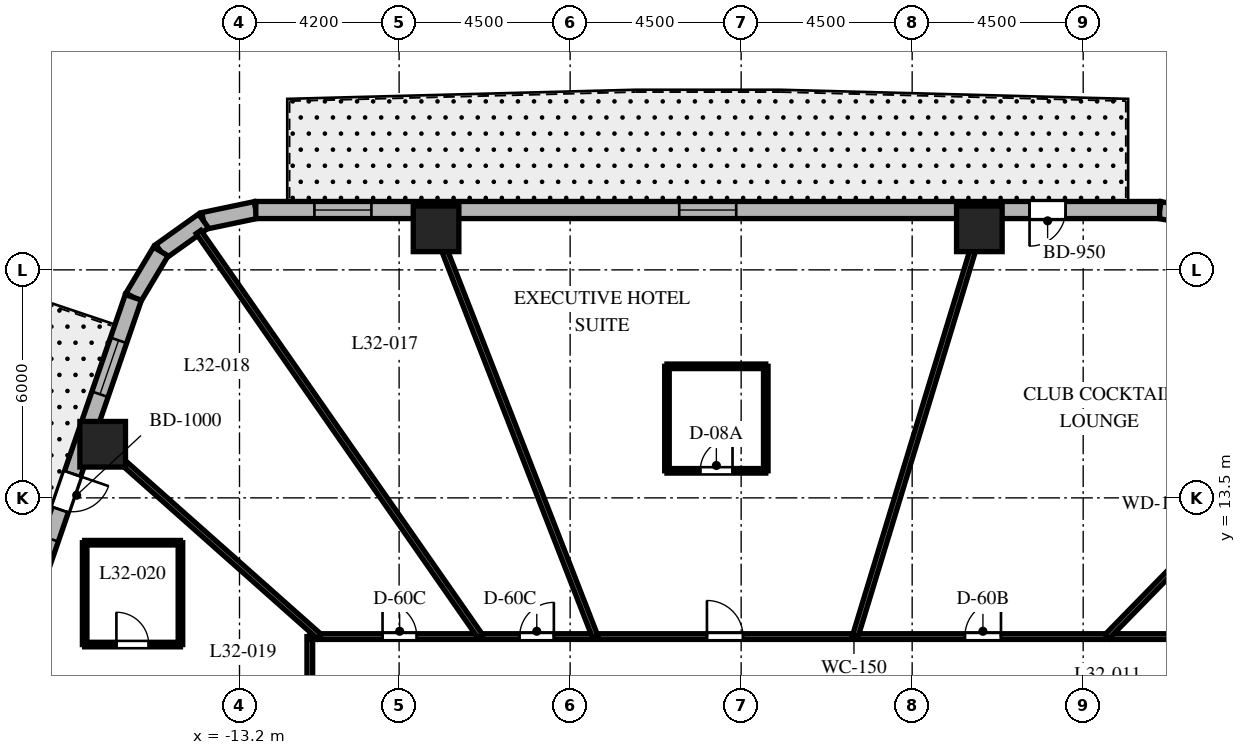
"""IFC4 building model, lengths in metres.
Left out: names, types, materials, properties, quantities, classifications, styles, units other than length and angle.
Written with IfcOpenShell. Run it as: python <this file> out.ifc"""

import sys

from ifc_helpers import new_model, si_unit, direction, frame, frame_2d, origin, origin_2d, place, context, subcontext, project, spatial, rectangle, extrude, element, fill, save


model = new_model("IFC4")
c1 = context("Model", 3, precision=1e-05, world=origin(), true_north=direction((0.0, 1.0)))
c2 = subcontext(c1, "Body", "Model", "MODEL_VIEW")
j1 = project(units=[si_unit("LENGTHUNIT", "METRE"), si_unit("PLANEANGLEUNIT", "RADIAN")], contexts=[c1])
p1 = place(None, origin())
s1 = spatial("IfcSite", under=j1, at=p1, CompositionType="ELEMENT")
p2 = place(p1, origin())
s2 = spatial("IfcBuilding", under=s1, at=p2, CompositionType="ELEMENT")
p3 = place(p2, frame((0.0, 0.0, 132.1)))
s3 = spatial("IfcBuildingStorey", under=s2, at=p3, CompositionType="ELEMENT", Elevation=132.1)
for number, where, z_axis, x_axis in (
    (1, (6.268, 20.58, 0.0), (0.0, 0.0, 1.0), (1.0, 0.0, 0.0)),
    (2, (-8.028, 20.58, 0.0), (0.0, 0.0, 1.0), (1.0, 0.0, 0.0)),
    (3, (-16.8, 14.911, 0.0), (0.0, 0.0, 1.0), (1.0, 0.0, 0.0)),
):
    element("IfcColumn", number, at=place(p3, frame(where, z_axis=z_axis, x_axis=x_axis)), inside=s3, PredefinedType="COLUMN", context=c2, shape_type="SweptSolid", body=[
        extrude(rectangle(XDim=1.2, YDim=1.2, at=origin_2d()), origin(), (0.0, 0.0, 1.0), 3.7),
    ])
p4 = place(p3, frame((12.259, 20.84, 0.0), z_axis=(0.0, 0.0, 1.0), x_axis=(-0.982730354425, 0.185043374624, 0.0)))
e4 = element("IfcWall", 4, at=p4, inside=s3, PredefinedType="SOLIDWALL", context=c2, shape_type="SweptSolid", body=[
    extrude(rectangle(XDim=1.269, YDim=0.45, at=frame_2d((0.635, 0.0))), origin(), (0.0, 0.0, 1.0), 3.4),
])
p5 = place(p3, frame((-12.771, 21.075, 0.0), z_axis=(0.0, 0.0, 1.0), x_axis=(-0.97874281988, -0.205091424819, 0.0)))
e5 = element("IfcWall", 5, at=p5, inside=s3, PredefinedType="SOLIDWALL", context=c2, shape_type="SweptSolid", body=[
    extrude(rectangle(XDim=1.406, YDim=0.45, at=frame_2d((0.703, 0.0))), origin(), (0.0, 0.0, 1.0), 3.4),
])
p6 = place(p3, frame((-14.146, 20.787, 0.0), z_axis=(0.0, 0.0, 1.0), x_axis=(-0.814162929117, -0.580636482536, 0.0)))
e6 = element("IfcWall", 6, at=p6, inside=s3, PredefinedType="SOLIDWALL", context=c2, shape_type="SweptSolid", body=[
    extrude(rectangle(XDim=1.382, YDim=0.45, at=frame_2d((0.691, 0.0))), origin(), (0.0, 0.0, 1.0), 3.4),
])
p7 = place(p3, frame((-15.272, 19.984, 0.0), z_axis=(0.0, 0.0, 1.0), x_axis=(-0.512579347361, -0.858639862025, 0.0)))
e7 = element("IfcWall", 7, at=p7, inside=s3, PredefinedType="SOLIDWALL", context=c2, shape_type="SweptSolid", body=[
    extrude(rectangle(XDim=1.406, YDim=0.45, at=frame_2d((0.703, 0.0))), origin(), (0.0, 0.0, 1.0), 3.4),
])
p8 = place(p3, frame((11.012, 21.075, 0.0), z_axis=(0.0, 0.0, 1.0), x_axis=(-1.0, 0.0, 0.0)))
e8 = element("IfcWall", 8, at=p8, inside=s3, PredefinedType="SOLIDWALL", context=c2, shape_type="SweptSolid", body=[
    extrude(rectangle(XDim=23.782, YDim=0.45, at=frame_2d((11.891, 0.0))), origin(), (0.0, 0.0, 1.0), 3.4),
])
p9 = place(p8, frame((2.473, 0.0, 0.0)))
e9 = element("IfcOpeningElement", 9, at=p9, cuts=e8, PredefinedType="OPENING", context=c2, shape_type="SweptSolid", body=[
    extrude(rectangle(XDim=0.95, YDim=2.15, at=frame_2d((0.475, 1.075))), frame((0.0, 0.235, 0.0), z_axis=(0.0, -1.0, 0.0), x_axis=(1.0, 0.0, 0.0)), (0.0, 0.0, 1.0), 0.47),
])
p10 = place(p8, frame((11.142, 0.0, 0.8)))
e10 = element("IfcOpeningElement", 10, at=p10, cuts=e8, PredefinedType="OPENING", context=c2, shape_type="SweptSolid", body=[
    extrude(rectangle(XDim=1.5, YDim=1.8, at=frame_2d((0.75, 0.9))), frame((0.0, 0.235, 0.0), z_axis=(0.0, -1.0, 0.0), x_axis=(1.0, 0.0, 0.0)), (0.0, 0.0, 1.0), 0.47),
])
p11 = place(p8, frame((20.741, 0.0, 0.8)))
e11 = element("IfcOpeningElement", 11, at=p11, cuts=e8, PredefinedType="OPENING", context=c2, shape_type="SweptSolid", body=[
    extrude(rectangle(XDim=1.5, YDim=1.8, at=frame_2d((0.75, 0.9))), frame((0.0, 0.235, 0.0), z_axis=(0.0, -1.0, 0.0), x_axis=(1.0, 0.0, 0.0)), (0.0, 0.0, 1.0), 0.47),
])
p12 = place(p3, frame((-15.992, 18.777, 0.0), z_axis=(0.0, 0.0, 1.0), x_axis=(-0.325606988926, -0.945505202927, 0.0)))
e12 = element("IfcWall", 12, at=p12, inside=s3, PredefinedType="SOLIDWALL", context=c2, shape_type="SweptSolid", body=[
    extrude(rectangle(XDim=19.669, YDim=0.45, at=frame_2d((9.835, 0.0))), origin(), (0.0, 0.0, 1.0), 3.4),
])
p13 = place(p12, frame((4.909, 0.0, 0.0)))
e13 = element("IfcOpeningElement", 13, at=p13, cuts=e12, PredefinedType="OPENING", context=c2, shape_type="SweptSolid", body=[
    extrude(rectangle(XDim=1.0, YDim=2.15, at=frame_2d((0.5, 1.075))), frame((0.0, 0.235, 0.0), z_axis=(0.0, -1.0, 0.0), x_axis=(1.0, 0.0, 0.0)), (0.0, 0.0, 1.0), 0.47),
])
p14 = place(p12, frame((1.197, 0.0, 0.8)))
e14 = element("IfcOpeningElement", 14, at=p14, cuts=e12, PredefinedType="OPENING", context=c2, shape_type="SweptSolid", body=[
    extrude(rectangle(XDim=1.5, YDim=1.8, at=frame_2d((0.75, 0.9))), frame((0.0, 0.235, 0.0), z_axis=(0.0, -1.0, 0.0), x_axis=(1.0, 0.0, 0.0)), (0.0, 0.0, 1.0), 0.47),
])
p15 = place(p12, frame((6.72, 0.0, 0.8)))
e15 = element("IfcOpeningElement", 15, at=p15, cuts=e12, PredefinedType="OPENING", context=c2, shape_type="SweptSolid", body=[
    extrude(rectangle(XDim=1.5, YDim=1.8, at=frame_2d((0.75, 0.9))), frame((0.0, 0.235, 0.0), z_axis=(0.0, -1.0, 0.0), x_axis=(1.0, 0.0, 0.0)), (0.0, 0.0, 1.0), 0.47),
])
p16 = place(p12, frame((12.238, 0.0, 0.8)))
e16 = element("IfcOpeningElement", 16, at=p16, cuts=e12, PredefinedType="OPENING", context=c2, shape_type="SweptSolid", body=[
    extrude(rectangle(XDim=1.5, YDim=1.8, at=frame_2d((0.75, 0.9))), frame((0.0, 0.235, 0.0), z_axis=(0.0, -1.0, 0.0), x_axis=(1.0, 0.0, 0.0)), (0.0, 0.0, 1.0), 0.47),
])
p17 = place(p12, frame((16.918, 0.0, 0.8)))
e17 = element("IfcOpeningElement", 17, at=p17, cuts=e12, PredefinedType="OPENING", context=c2, shape_type="SweptSolid", body=[
    extrude(rectangle(XDim=1.5, YDim=1.8, at=frame_2d((0.75, 0.9))), frame((0.0, 0.235, 0.0), z_axis=(0.0, -1.0, 0.0), x_axis=(1.0, 0.0, 0.0)), (0.0, 0.0, 1.0), 0.47),
])
p18 = place(p3, frame((-11.35, -9.85, 0.0), z_axis=(0.0, 0.0, 1.0), x_axis=(0.0, 1.0, 0.0)))
e18 = element("IfcWall", 18, at=p18, inside=s3, PredefinedType="PARTITIONING", context=c2, shape_type="SweptSolid", body=[
    extrude(rectangle(XDim=19.7, YDim=0.15, at=frame_2d((9.85, 0.0))), origin(), (0.0, 0.0, 1.0), 2.84),
])
p19 = place(p18, frame((16.711, 0.0, 0.0)))
e19 = element("IfcOpeningElement", 19, at=p19, cuts=e18, PredefinedType="OPENING", context=c2, shape_type="SweptSolid", body=[
    extrude(rectangle(XDim=0.95, YDim=2.03, at=frame_2d((0.475, 1.015))), frame((0.0, 0.085, 0.0), z_axis=(0.0, -1.0, 0.0), x_axis=(1.0, 0.0, 0.0)), (0.0, 0.0, 1.0), 0.17),
])
p20 = place(p18, frame((12.968, 0.0, 0.0)))
e20 = element("IfcOpeningElement", 20, at=p20, cuts=e18, PredefinedType="OPENING", context=c2, shape_type="SweptSolid", body=[
    extrude(rectangle(XDim=0.9, YDim=2.03, at=frame_2d((0.45, 1.015))), frame((0.0, 0.085, 0.0), z_axis=(0.0, -1.0, 0.0), x_axis=(1.0, 0.0, 0.0)), (0.0, 0.0, 1.0), 0.17),
])
p21 = place(p18, frame((8.836, 0.0, 0.0)))
e21 = element("IfcOpeningElement", 21, at=p21, cuts=e18, PredefinedType="OPENING", context=c2, shape_type="SweptSolid", body=[
    extrude(rectangle(XDim=0.95, YDim=2.03, at=frame_2d((0.475, 1.015))), frame((0.0, 0.085, 0.0), z_axis=(0.0, -1.0, 0.0), x_axis=(1.0, 0.0, 0.0)), (0.0, 0.0, 1.0), 0.17),
])
p22 = place(p18, frame((4.448, 0.0, 0.0)))
e22 = element("IfcOpeningElement", 22, at=p22, cuts=e18, PredefinedType="OPENING", context=c2, shape_type="SweptSolid", body=[
    extrude(rectangle(XDim=0.95, YDim=2.03, at=frame_2d((0.475, 1.015))), frame((0.0, 0.085, 0.0), z_axis=(0.0, -1.0, 0.0), x_axis=(1.0, 0.0, 0.0)), (0.0, 0.0, 1.0), 0.17),
])
p23 = place(p18, frame((1.249, 0.0, 0.0)))
e23 = element("IfcOpeningElement", 23, at=p23, cuts=e18, PredefinedType="OPENING", context=c2, shape_type="SweptSolid", body=[
    extrude(rectangle(XDim=0.9, YDim=2.03, at=frame_2d((0.45, 1.015))), frame((0.0, 0.085, 0.0), z_axis=(0.0, -1.0, 0.0), x_axis=(1.0, 0.0, 0.0)), (0.0, 0.0, 1.0), 0.17),
])
p24 = place(p3, frame((-11.35, 9.85, 0.0), z_axis=(0.0, 0.0, 1.0), x_axis=(1.0, 0.0, 0.0)))
e24 = element("IfcWall", 24, at=p24, inside=s3, PredefinedType="PARTITIONING", context=c2, shape_type="SweptSolid", body=[
    extrude(rectangle(XDim=22.7, YDim=0.15, at=frame_2d((11.35, 0.0))), origin(), (0.0, 0.0, 1.0), 2.84),
])
p25 = place(p24, frame((17.237, 0.0, 0.0)))
e25 = element("IfcOpeningElement", 25, at=p25, cuts=e24, PredefinedType="OPENING", context=c2, shape_type="SweptSolid", body=[
    extrude(rectangle(XDim=0.95, YDim=2.03, at=frame_2d((0.475, 1.015))), frame((0.0, 0.085, 0.0), z_axis=(0.0, -1.0, 0.0), x_axis=(1.0, 0.0, 0.0)), (0.0, 0.0, 1.0), 0.17),
])
p26 = place(p24, frame((10.45, 0.0, 0.0)))
e26 = element("IfcOpeningElement", 26, at=p26, cuts=e24, PredefinedType="OPENING", context=c2, shape_type="SweptSolid", body=[
    extrude(rectangle(XDim=0.95, YDim=2.03, at=frame_2d((0.475, 1.015))), frame((0.0, 0.085, 0.0), z_axis=(0.0, -1.0, 0.0), x_axis=(1.0, 0.0, 0.0)), (0.0, 0.0, 1.0), 0.17),
])
p27 = place(p24, frame((5.522, 0.0, 0.0)))
e27 = element("IfcOpeningElement", 27, at=p27, cuts=e24, PredefinedType="OPENING", context=c2, shape_type="SweptSolid", body=[
    extrude(rectangle(XDim=0.9, YDim=2.03, at=frame_2d((0.45, 1.015))), frame((0.0, 0.085, 0.0), z_axis=(0.0, -1.0, 0.0), x_axis=(1.0, 0.0, 0.0)), (0.0, 0.0, 1.0), 0.17),
])
p28 = place(p24, frame((1.914, 0.0, 0.0)))
e28 = element("IfcOpeningElement", 28, at=p28, cuts=e24, PredefinedType="OPENING", context=c2, shape_type="SweptSolid", body=[
    extrude(rectangle(XDim=0.9, YDim=2.03, at=frame_2d((0.45, 1.015))), frame((0.0, 0.085, 0.0), z_axis=(0.0, -1.0, 0.0), x_axis=(1.0, 0.0, 0.0)), (0.0, 0.0, 1.0), 0.17),
])
p29 = place(p3, frame((9.628, 9.85, 0.0), z_axis=(0.0, 0.0, 1.0), x_axis=(0.698992824326, 0.715128681805, 0.0)))
e29 = element("IfcWall", 29, at=p29, inside=s3, PredefinedType="PARTITIONING", context=c2, shape_type="SweptSolid", body=[
    extrude(rectangle(XDim=8.579, YDim=0.15, at=frame_2d((4.29, 0.0))), origin(), (0.0, 0.0, 1.0), 2.54),
])
p30 = place(p3, frame((3.0, 9.85, 0.0), z_axis=(0.0, 0.0, 1.0), x_axis=(0.291352035382, 0.95661590593, 0.0)))
e30 = element("IfcWall", 30, at=p30, inside=s3, PredefinedType="PARTITIONING", context=c2, shape_type="SweptSolid", body=[
    extrude(rectangle(XDim=11.734, YDim=0.15, at=frame_2d((5.867, 0.0))), origin(), (0.0, 0.0, 1.0), 2.54),
])
p31 = place(p3, frame((-3.842, 9.85, 0.0), z_axis=(0.0, 0.0, 1.0), x_axis=(-0.363432685593, 0.931620460833, 0.0)))
e31 = element("IfcWall", 31, at=p31, inside=s3, PredefinedType="PARTITIONING", context=c2, shape_type="SweptSolid", body=[
    extrude(rectangle(XDim=12.049, YDim=0.15, at=frame_2d((6.024, 0.0))), origin(), (0.0, 0.0, 1.0), 2.54),
])
p32 = place(p3, frame((-6.861, 9.85, 0.0), z_axis=(0.0, 0.0, 1.0), x_axis=(-0.571575431292, 0.820549527051, 0.0)))
e32 = element("IfcWall", 32, at=p32, inside=s3, PredefinedType="PARTITIONING", context=c2, shape_type="SweptSolid", body=[
    extrude(rectangle(XDim=12.975, YDim=0.15, at=frame_2d((6.488, 0.0))), origin(), (0.0, 0.0, 1.0), 2.54),
])
p33 = place(p3, frame((-11.098, 9.85, 0.0), z_axis=(0.0, 0.0, 1.0), x_axis=(-0.747904295103, 0.663806572253, 0.0)))
e33 = element("IfcWall", 33, at=p33, inside=s3, PredefinedType="PARTITIONING", context=c2, shape_type="SweptSolid", body=[
    extrude(rectangle(XDim=8.16, YDim=0.15, at=frame_2d((4.08, 0.0))), origin(), (0.0, 0.0, 1.0), 2.54),
])
p34 = place(p3, frame((-1.952, 14.212, 0.0), z_axis=(0.0, 0.0, 1.0), x_axis=(1.0, 0.0, 0.0)))
e34 = element("IfcWall", 34, at=p34, inside=s3, PredefinedType="PARTITIONING", context=c2, shape_type="SweptSolid", body=[
    extrude(rectangle(XDim=2.6, YDim=0.12, at=frame_2d((1.3, 0.0))), origin(), (0.0, 0.0, 1.0), 3.4),
])
p35 = place(p34, frame((0.875, 0.0, 0.0)))
e35 = element("IfcOpeningElement", 35, at=p35, cuts=e34, PredefinedType="OPENING", context=c2, shape_type="SweptSolid", body=[
    extrude(rectangle(XDim=0.85, YDim=2.03, at=frame_2d((0.425, 1.015))), frame((0.0, 0.07, 0.0), z_axis=(0.0, -1.0, 0.0), x_axis=(1.0, 0.0, 0.0)), (0.0, 0.0, 1.0), 0.14),
])
p36 = place(p3, frame((0.648, 14.212, 0.0), z_axis=(0.0, 0.0, 1.0), x_axis=(0.0, 1.0, 0.0)))
e36 = element("IfcWall", 36, at=p36, inside=s3, PredefinedType="PARTITIONING", context=c2, shape_type="SweptSolid", body=[
    extrude(rectangle(XDim=2.75, YDim=0.12, at=frame_2d((1.375, 0.0))), origin(), (0.0, 0.0, 1.0), 2.84),
])
p37 = place(p3, frame((0.648, 16.962, 0.0), z_axis=(0.0, 0.0, 1.0), x_axis=(-1.0, 0.0, 0.0)))
e37 = element("IfcWall", 37, at=p37, inside=s3, PredefinedType="PARTITIONING", context=c2, shape_type="SweptSolid", body=[
    extrude(rectangle(XDim=2.6, YDim=0.12, at=frame_2d((1.3, 0.0))), origin(), (0.0, 0.0, 1.0), 3.4),
])
p38 = place(p3, frame((-1.952, 16.962, 0.0), z_axis=(0.0, 0.0, 1.0), x_axis=(0.0, -1.0, 0.0)))
e38 = element("IfcWall", 38, at=p38, inside=s3, PredefinedType="PARTITIONING", context=c2, shape_type="SweptSolid", body=[
    extrude(rectangle(XDim=2.75, YDim=0.12, at=frame_2d((1.375, 0.0))), origin(), (0.0, 0.0, 1.0), 2.84),
])
p39 = place(p3, frame((-17.274, 9.64, 0.0), z_axis=(0.0, 0.0, 1.0), x_axis=(1.0, 0.0, 0.0)))
e39 = element("IfcWall", 39, at=p39, inside=s3, PredefinedType="PARTITIONING", context=c2, shape_type="SweptSolid", body=[
    extrude(rectangle(XDim=2.52, YDim=0.12, at=frame_2d((1.26, 0.0))), origin(), (0.0, 0.0, 1.0), 2.972),
])
p40 = place(p39, frame((0.835, 0.0, 0.0)))
e40 = element("IfcOpeningElement", 40, at=p40, cuts=e39, PredefinedType="OPENING", context=c2, shape_type="SweptSolid", body=[
    extrude(rectangle(XDim=0.85, YDim=2.03, at=frame_2d((0.425, 1.015))), frame((0.0, 0.07, 0.0), z_axis=(0.0, -1.0, 0.0), x_axis=(1.0, 0.0, 0.0)), (0.0, 0.0, 1.0), 0.14),
])
p41 = place(p3, frame((-14.754, 9.64, 0.0), z_axis=(0.0, 0.0, 1.0), x_axis=(0.0, 1.0, 0.0)))
e41 = element("IfcWall", 41, at=p41, inside=s3, PredefinedType="PARTITIONING", context=c2, shape_type="SweptSolid", body=[
    extrude(rectangle(XDim=2.68, YDim=0.12, at=frame_2d((1.34, 0.0))), origin(), (0.0, 0.0, 1.0), 2.972),
])
p42 = place(p3, frame((-14.754, 12.32, 0.0), z_axis=(0.0, 0.0, 1.0), x_axis=(-1.0, 0.0, 0.0)))
e42 = element("IfcWall", 42, at=p42, inside=s3, PredefinedType="PARTITIONING", context=c2, shape_type="SweptSolid", body=[
    extrude(rectangle(XDim=2.52, YDim=0.12, at=frame_2d((1.26, 0.0))), origin(), (0.0, 0.0, 1.0), 3.4),
])
p43 = place(p3, frame((-17.274, 12.32, 0.0), z_axis=(0.0, 0.0, 1.0), x_axis=(0.0, -1.0, 0.0)))
e43 = element("IfcWall", 43, at=p43, inside=s3, PredefinedType="PARTITIONING", context=c2, shape_type="SweptSolid", body=[
    extrude(rectangle(XDim=2.68, YDim=0.12, at=frame_2d((1.34, 0.0))), origin(), (0.0, 0.0, 1.0), 3.4),
])
p44 = place(p9, origin())
e44 = element("IfcDoor", 44, at=p44, inside=s3, OperationType="SINGLE_SWING_RIGHT", PredefinedType="DOOR", context=c2, shape_type="SweptSolid", body=[
    extrude(rectangle(XDim=0.95, YDim=2.15, at=frame_2d((0.475, 1.075))), frame((0.0, 0.025, 0.0), z_axis=(0.0, -1.0, 0.0), x_axis=(1.0, 0.0, 0.0)), (0.0, 0.0, 1.0), 0.05),
])
fill(e9, e44)
p45 = place(p10, origin())
e45 = element("IfcWindow", 45, at=p45, inside=s3, PartitioningType="SINGLE_PANEL", PredefinedType="WINDOW", context=c2, shape_type="SweptSolid", body=[
    extrude(rectangle(XDim=1.5, YDim=1.8, at=frame_2d((0.75, 0.9))), frame((0.0, 0.03, 0.0), z_axis=(0.0, -1.0, 0.0), x_axis=(1.0, 0.0, 0.0)), (0.0, 0.0, 1.0), 0.06),
])
fill(e10, e45)
p46 = place(p11, origin())
e46 = element("IfcWindow", 46, at=p46, inside=s3, PartitioningType="SINGLE_PANEL", PredefinedType="WINDOW", context=c2, shape_type="SweptSolid", body=[
    extrude(rectangle(XDim=1.5, YDim=1.8, at=frame_2d((0.75, 0.9))), frame((0.0, 0.03, 0.0), z_axis=(0.0, -1.0, 0.0), x_axis=(1.0, 0.0, 0.0)), (0.0, 0.0, 1.0), 0.06),
])
fill(e11, e46)
p47 = place(p13, origin())
e47 = element("IfcDoor", 47, at=p47, inside=s3, OperationType="SINGLE_SWING_LEFT", PredefinedType="DOOR", context=c2, shape_type="SweptSolid", body=[
    extrude(rectangle(XDim=1.0, YDim=2.15, at=frame_2d((0.5, 1.075))), frame((0.0, 0.025, 0.0), z_axis=(0.0, -1.0, 0.0), x_axis=(1.0, 0.0, 0.0)), (0.0, 0.0, 1.0), 0.05),
])
fill(e13, e47)
p48 = place(p14, origin())
e48 = element("IfcWindow", 48, at=p48, inside=s3, PartitioningType="SINGLE_PANEL", PredefinedType="WINDOW", context=c2, shape_type="SweptSolid", body=[
    extrude(rectangle(XDim=1.5, YDim=1.8, at=frame_2d((0.75, 0.9))), frame((0.0, 0.03, 0.0), z_axis=(0.0, -1.0, 0.0), x_axis=(1.0, 0.0, 0.0)), (0.0, 0.0, 1.0), 0.06),
])
fill(e14, e48)
p49 = place(p25, origin())
e49 = element("IfcDoor", 49, at=p49, inside=s3, OperationType="SINGLE_SWING_RIGHT", PredefinedType="DOOR", context=c2, shape_type="SweptSolid", body=[
    extrude(rectangle(XDim=0.95, YDim=2.03, at=frame_2d((0.475, 1.015))), frame((0.0, 0.025, 0.0), z_axis=(0.0, -1.0, 0.0), x_axis=(1.0, 0.0, 0.0)), (0.0, 0.0, 1.0), 0.05),
])
fill(e25, e49)
p50 = place(p26, origin())
e50 = element("IfcDoor", 50, at=p50, inside=s3, OperationType="SINGLE_SWING_LEFT", PredefinedType="DOOR", context=c2, shape_type="SweptSolid", body=[
    extrude(rectangle(XDim=0.95, YDim=2.03, at=frame_2d((0.475, 1.015))), frame((0.0, 0.025, 0.0), z_axis=(0.0, -1.0, 0.0), x_axis=(1.0, 0.0, 0.0)), (0.0, 0.0, 1.0), 0.05),
])
fill(e26, e50)
p51 = place(p35, origin())
e51 = element("IfcDoor", 51, at=p51, inside=s3, OperationType="SINGLE_SWING_RIGHT", PredefinedType="DOOR", context=c2, shape_type="SweptSolid", body=[
    extrude(rectangle(XDim=0.85, YDim=2.03, at=frame_2d((0.425, 1.015))), frame((0.0, 0.025, 0.0), z_axis=(0.0, -1.0, 0.0), x_axis=(1.0, 0.0, 0.0)), (0.0, 0.0, 1.0), 0.05),
])
fill(e35, e51)
p52 = place(p27, origin())
e52 = element("IfcDoor", 52, at=p52, inside=s3, OperationType="SINGLE_SWING_RIGHT", PredefinedType="DOOR", context=c2, shape_type="SweptSolid", body=[
    extrude(rectangle(XDim=0.9, YDim=2.03, at=frame_2d((0.45, 1.015))), frame((0.0, 0.025, 0.0), z_axis=(0.0, -1.0, 0.0), x_axis=(1.0, 0.0, 0.0)), (0.0, 0.0, 1.0), 0.05),
])
fill(e27, e52)
p53 = place(p28, origin())
e53 = element("IfcDoor", 53, at=p53, inside=s3, OperationType="SINGLE_SWING_LEFT", PredefinedType="DOOR", context=c2, shape_type="SweptSolid", body=[
    extrude(rectangle(XDim=0.9, YDim=2.03, at=frame_2d((0.45, 1.015))), frame((0.0, 0.025, 0.0), z_axis=(0.0, -1.0, 0.0), x_axis=(1.0, 0.0, 0.0)), (0.0, 0.0, 1.0), 0.05),
])
fill(e28, e53)
p54 = place(p40, origin())
e54 = element("IfcDoor", 54, at=p54, inside=s3, OperationType="SINGLE_SWING_LEFT", PredefinedType="DOOR", context=c2, shape_type="SweptSolid", body=[
    extrude(rectangle(XDim=0.85, YDim=2.03, at=frame_2d((0.425, 1.015))), frame((0.0, 0.025, 0.0), z_axis=(0.0, -1.0, 0.0), x_axis=(1.0, 0.0, 0.0)), (0.0, 0.0, 1.0), 0.05),
])
fill(e40, e54)
save(model, sys.argv[1])
